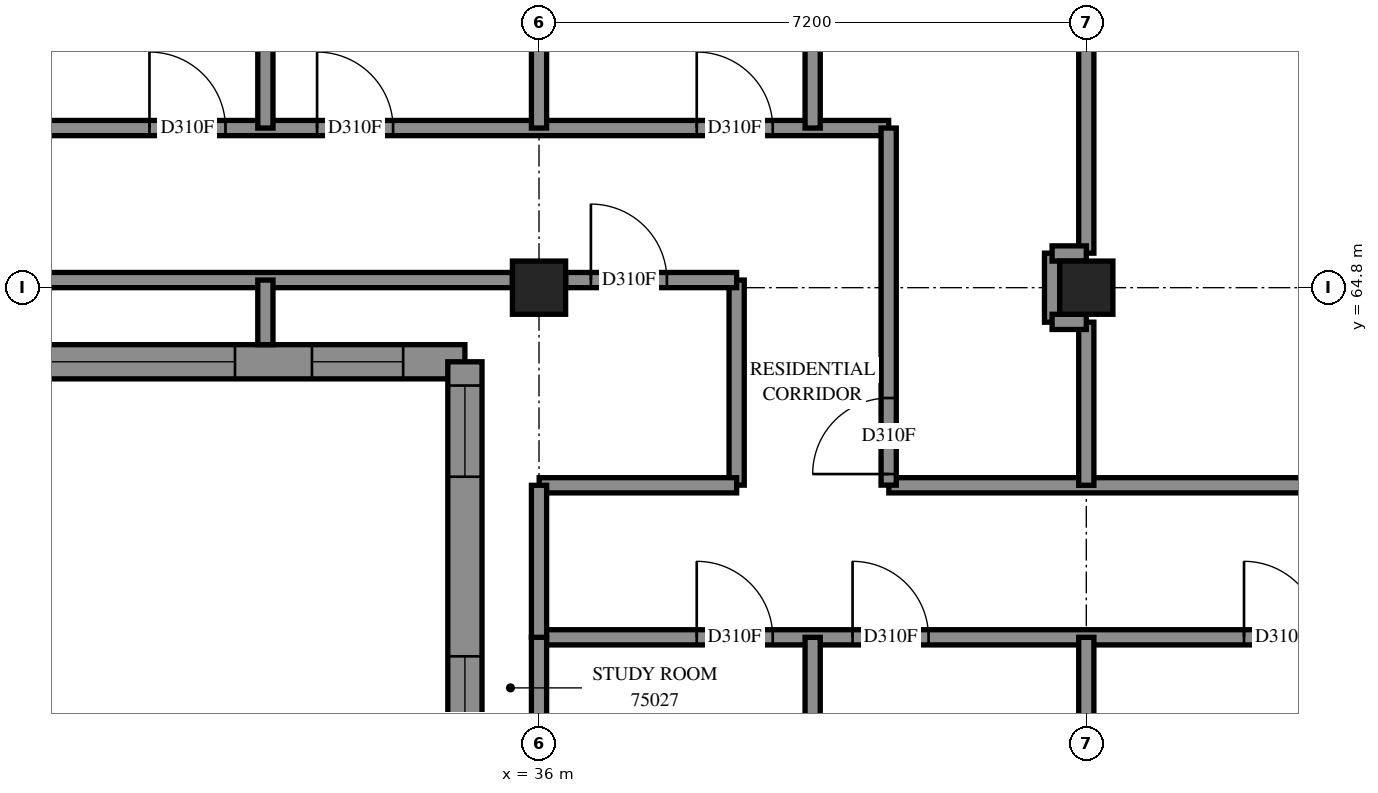
"""IFC4 building model, lengths in metres.
Left out: names, types, materials, properties, quantities, classifications, styles, units other than length and angle.
Written with IfcOpenShell. Run it as: python <this file> out.ifc"""

import sys

from ifc_helpers import new_model, si_unit, direction, frame, frame_2d, origin, origin_2d, place, context, subcontext, project, spatial, polyline, rectangle, outline, extrude, element, fill, save


model = new_model("IFC4")
c1 = context("Model", 3, precision=1e-05, world=origin(), true_north=direction((0.0, 1.0)))
c2 = subcontext(c1, "Body", "Model", "MODEL_VIEW")
j1 = project(units=[si_unit("LENGTHUNIT", "METRE"), si_unit("PLANEANGLEUNIT", "RADIAN")], contexts=[c1])
p1 = place(None, origin())
s1 = spatial("IfcSite", under=j1, at=p1, CompositionType="ELEMENT")
p2 = place(p1, origin())
s2 = spatial("IfcBuilding", under=s1, at=p2, CompositionType="ELEMENT")
p3 = place(p2, frame((0.0, 0.0, 274.4)))
s3 = spatial("IfcBuildingStorey", under=s2, at=p3, CompositionType="ELEMENT", Elevation=274.4)
for number, where, z_axis, x_axis in (
    (1, (36.0, 64.8, 0.0), (0.0, 0.0, 1.0), (1.0, 0.0, 0.0)),
    (2, (43.2, 64.8, 0.0), (0.0, 0.0, 1.0), (1.0, 0.0, 0.0)),
):
    element("IfcColumn", number, at=place(p3, frame(where, z_axis=z_axis, x_axis=x_axis)), inside=s3, PredefinedType="COLUMN", context=c2, shape_type="SweptSolid", body=[
        extrude(rectangle(XDim=0.7, YDim=0.7, at=origin_2d()), origin(), (0.0, 0.0, 1.0), 3.1),
    ])
p4 = place(p3, frame((26.653, 63.825, 0.0), z_axis=(0.0, 0.0, 1.0), x_axis=(1.0, 0.0, 0.0)))
e3 = element("IfcWall", 3, at=p4, inside=s3, PredefinedType="SOLIDWALL", context=c2, shape_type="SweptSolid", body=[
    extrude(outline(polyline([(-0.225, -0.225), (8.147, -0.225), (8.597, 0.225), (0.225, 0.225), (-0.225, -0.225)])), origin(), (0.0, 0.0, 1.0), 3.1),
])
p5 = place(p4, frame((2.547, 0.0, 0.45)))
e4 = element("IfcOpeningElement", 4, at=p5, cuts=e3, PredefinedType="OPENING", context=c2, shape_type="SweptSolid", body=[
    extrude(rectangle(XDim=2.8, YDim=2.55, at=frame_2d((1.4, 1.275))), frame((0.0, 0.235, 0.0), z_axis=(0.0, -1.0, 0.0), x_axis=(1.0, 0.0, 0.0)), (0.0, 0.0, 1.0), 0.47),
])
p6 = place(p4, frame((0.686, 0.0, 0.45)))
e5 = element("IfcOpeningElement", 5, at=p6, cuts=e3, PredefinedType="OPENING", context=c2, shape_type="SweptSolid", body=[
    extrude(rectangle(XDim=1.2, YDim=2.55, at=frame_2d((0.6, 1.275))), frame((0.0, 0.235, 0.0), z_axis=(0.0, -1.0, 0.0), x_axis=(1.0, 0.0, 0.0)), (0.0, 0.0, 1.0), 0.47),
])
p7 = place(p4, frame((6.359, 0.0, 0.45)))
e6 = element("IfcOpeningElement", 6, at=p7, cuts=e3, PredefinedType="OPENING", context=c2, shape_type="SweptSolid", body=[
    extrude(rectangle(XDim=1.2, YDim=2.55, at=frame_2d((0.6, 1.275))), frame((0.0, 0.235, 0.0), z_axis=(0.0, -1.0, 0.0), x_axis=(1.0, 0.0, 0.0)), (0.0, 0.0, 1.0), 0.47),
])
p8 = place(p3, frame((35.025, 63.825, 0.0), z_axis=(0.0, 0.0, 1.0), x_axis=(0.0, -1.0, 0.0)))
e7 = element("IfcWall", 7, at=p8, inside=s3, PredefinedType="SOLIDWALL", context=c2, shape_type="SweptSolid", body=[
    extrude(outline(polyline([(0.225, -0.225), (7.425, -0.225), (6.975, 0.225), (-0.225, 0.225), (0.225, -0.225)])), origin(), (0.0, 0.0, 1.0), 3.1),
])
p9 = place(p8, frame((0.312, 0.0, 0.45)))
e8 = element("IfcOpeningElement", 8, at=p9, cuts=e7, PredefinedType="OPENING", context=c2, shape_type="SweptSolid", body=[
    extrude(rectangle(XDim=1.2, YDim=2.55, at=frame_2d((0.6, 1.275))), frame((0.0, 0.235, 0.0), z_axis=(0.0, -1.0, 0.0), x_axis=(1.0, 0.0, 0.0)), (0.0, 0.0, 1.0), 0.47),
])
p10 = place(p8, frame((3.875, 0.0, 0.7)))
e9 = element("IfcOpeningElement", 9, at=p10, cuts=e7, PredefinedType="OPENING", context=c2, shape_type="SweptSolid", body=[
    extrude(rectangle(XDim=1.8, YDim=2.3, at=frame_2d((0.9, 1.15))), frame((0.0, 0.235, 0.0), z_axis=(0.0, -1.0, 0.0), x_axis=(1.0, 0.0, 0.0)), (0.0, 0.0, 1.0), 0.47),
])
p11 = place(p3, frame((36.0, 60.2, 0.0), z_axis=(0.0, 0.0, 1.0), x_axis=(1.0, 0.0, 0.0)))
e10 = element("IfcWall", 10, at=p11, inside=s3, PredefinedType="PARTITIONING", context=c2, shape_type="SweptSolid", body=[
    extrude(rectangle(XDim=17.0, YDim=0.2, at=frame_2d((8.5, 0.0))), origin(), (0.0, 0.0, 1.0), 3.1),
])
p12 = place(p11, frame((15.802, 0.0, 0.0)))
e11 = element("IfcOpeningElement", 11, at=p12, cuts=e10, PredefinedType="OPENING", context=c2, shape_type="SweptSolid", body=[
    extrude(rectangle(XDim=1.0, YDim=2.1, at=frame_2d((0.5, 1.05))), frame((0.0, 0.11, 0.0), z_axis=(0.0, -1.0, 0.0), x_axis=(1.0, 0.0, 0.0)), (0.0, 0.0, 1.0), 0.22),
])
p13 = place(p11, frame((2.075, 0.0, 0.0)))
e12 = element("IfcOpeningElement", 12, at=p13, cuts=e10, PredefinedType="OPENING", context=c2, shape_type="SweptSolid", body=[
    extrude(rectangle(XDim=1.0, YDim=2.1, at=frame_2d((0.5, 1.05))), frame((0.0, 0.11, 0.0), z_axis=(0.0, -1.0, 0.0), x_axis=(1.0, 0.0, 0.0)), (0.0, 0.0, 1.0), 0.22),
])
p14 = place(p11, frame((4.125, 0.0, 0.0)))
e13 = element("IfcOpeningElement", 13, at=p14, cuts=e10, PredefinedType="OPENING", context=c2, shape_type="SweptSolid", body=[
    extrude(rectangle(XDim=1.0, YDim=2.1, at=frame_2d((0.5, 1.05))), frame((0.0, 0.11, 0.0), z_axis=(0.0, -1.0, 0.0), x_axis=(1.0, 0.0, 0.0)), (0.0, 0.0, 1.0), 0.22),
])
p15 = place(p11, frame((9.275, 0.0, 0.0)))
e14 = element("IfcOpeningElement", 14, at=p15, cuts=e10, PredefinedType="OPENING", context=c2, shape_type="SweptSolid", body=[
    extrude(rectangle(XDim=1.0, YDim=2.1, at=frame_2d((0.5, 1.05))), frame((0.0, 0.11, 0.0), z_axis=(0.0, -1.0, 0.0), x_axis=(1.0, 0.0, 0.0)), (0.0, 0.0, 1.0), 0.22),
])
p16 = place(p11, frame((11.48, 0.0, 0.0)))
e15 = element("IfcOpeningElement", 15, at=p16, cuts=e10, PredefinedType="OPENING", context=c2, shape_type="SweptSolid", body=[
    extrude(rectangle(XDim=1.0, YDim=2.1, at=frame_2d((0.5, 1.05))), frame((0.0, 0.11, 0.0), z_axis=(0.0, -1.0, 0.0), x_axis=(1.0, 0.0, 0.0)), (0.0, 0.0, 1.0), 0.22),
])
p17 = place(p3, frame((28.8, 66.9, 0.0), z_axis=(0.0, 0.0, 1.0), x_axis=(1.0, 0.0, 0.0)))
e16 = element("IfcWall", 16, at=p17, inside=s3, PredefinedType="PARTITIONING", context=c2, shape_type="SweptSolid", body=[
    extrude(rectangle(XDim=11.8, YDim=0.2, at=frame_2d((5.9, 0.0))), origin(), (0.0, 0.0, 1.0), 3.1),
])
p18 = place(p17, frame((2.075, 0.0, 0.0)))
e17 = element("IfcOpeningElement", 17, at=p18, cuts=e16, PredefinedType="OPENING", context=c2, shape_type="SweptSolid", body=[
    extrude(rectangle(XDim=1.0, YDim=2.1, at=frame_2d((0.5, 1.05))), frame((0.0, 0.11, 0.0), z_axis=(0.0, -1.0, 0.0), x_axis=(1.0, 0.0, 0.0)), (0.0, 0.0, 1.0), 0.22),
])
p19 = place(p17, frame((9.275, 0.0, 0.0)))
e18 = element("IfcOpeningElement", 18, at=p19, cuts=e16, PredefinedType="OPENING", context=c2, shape_type="SweptSolid", body=[
    extrude(rectangle(XDim=1.0, YDim=2.1, at=frame_2d((0.5, 1.05))), frame((0.0, 0.11, 0.0), z_axis=(0.0, -1.0, 0.0), x_axis=(1.0, 0.0, 0.0)), (0.0, 0.0, 1.0), 0.22),
])
p20 = place(p17, frame((4.28, 0.0, 0.0)))
e19 = element("IfcOpeningElement", 19, at=p20, cuts=e16, PredefinedType="OPENING", context=c2, shape_type="SweptSolid", body=[
    extrude(rectangle(XDim=1.0, YDim=2.1, at=frame_2d((0.5, 1.05))), frame((0.0, 0.11, 0.0), z_axis=(0.0, -1.0, 0.0), x_axis=(1.0, 0.0, 0.0)), (0.0, 0.0, 1.0), 0.22),
])
p21 = place(p3, frame((40.602, 62.2, 0.0), z_axis=(0.0, 0.0, 1.0), x_axis=(1.0, 0.0, 0.0)))
e20 = element("IfcWall", 20, at=p21, inside=s3, PredefinedType="PARTITIONING", context=c2, shape_type="SweptSolid", body=[
    extrude(rectangle(XDim=9.798, YDim=0.2, at=frame_2d((4.899, 0.0))), origin(), (0.0, 0.0, 1.0), 3.1),
])
p22 = place(p21, frame((6.446, 0.0, 0.0)))
e21 = element("IfcOpeningElement", 21, at=p22, cuts=e20, PredefinedType="OPENING", context=c2, shape_type="SweptSolid", body=[
    extrude(rectangle(XDim=1.0, YDim=2.1, at=frame_2d((0.5, 1.05))), frame((0.0, 0.11, 0.0), z_axis=(0.0, -1.0, 0.0), x_axis=(1.0, 0.0, 0.0)), (0.0, 0.0, 1.0), 0.22),
])
p23 = place(p3, frame((29.15, 64.9, 0.0), z_axis=(0.0, 0.0, 1.0), x_axis=(1.0, 0.0, 0.0)))
e22 = element("IfcWall", 22, at=p23, inside=s3, PredefinedType="PARTITIONING", context=c2, shape_type="SweptSolid", body=[
    extrude(rectangle(XDim=6.5, YDim=0.2, at=frame_2d((3.25, 0.0))), origin(), (0.0, 0.0, 1.0), 2.6),
])
p24 = place(p3, frame((43.2, 65.254, 0.0), z_axis=(0.0, 0.0, 1.0), x_axis=(0.0, 1.0, 0.0)))
e23 = element("IfcWall", 23, at=p24, inside=s3, PredefinedType="PARTITIONING", context=c2, shape_type="SweptSolid", body=[
    extrude(rectangle(XDim=6.292, YDim=0.2, at=frame_2d((3.146, 0.0))), origin(), (0.0, 0.0, 1.0), 3.1),
])
p25 = place(p3, frame((32.4, 66.9, 0.0), z_axis=(0.0, 0.0, 1.0), x_axis=(0.0, 1.0, 0.0)))
e24 = element("IfcWall", 24, at=p25, inside=s3, PredefinedType="PARTITIONING", context=c2, shape_type="SweptSolid", body=[
    extrude(rectangle(XDim=6.163, YDim=0.2, at=frame_2d((3.081, 0.0))), origin(), (0.0, 0.0, 1.0), 3.1),
])
p26 = place(p3, frame((39.6, 66.9, 0.0), z_axis=(0.0, 0.0, 1.0), x_axis=(0.0, 1.0, 0.0)))
e25 = element("IfcWall", 25, at=p26, inside=s3, PredefinedType="PARTITIONING", context=c2, shape_type="SweptSolid", body=[
    extrude(rectangle(XDim=6.091, YDim=0.2, at=frame_2d((3.046, 0.0))), origin(), (0.0, 0.0, 1.0), 3.1),
])
p27 = place(p3, frame((40.6, 62.202, 0.0), z_axis=(0.0, 0.0, 1.0), x_axis=(0.0, 1.0, 0.0)))
e26 = element("IfcWall", 26, at=p27, inside=s3, PredefinedType="PARTITIONING", context=c2, shape_type="SweptSolid", body=[
    extrude(rectangle(XDim=4.698, YDim=0.2, at=frame_2d((2.349, 0.0))), origin(), (0.0, 0.0, 1.0), 3.1),
])
p28 = place(p27, frame((0.146, 0.0, 0.0)))
e27 = element("IfcOpeningElement", 27, at=p28, cuts=e26, PredefinedType="OPENING", context=c2, shape_type="SweptSolid", body=[
    extrude(rectangle(XDim=1.0, YDim=2.1, at=frame_2d((0.5, 1.05))), frame((0.0, 0.11, 0.0), z_axis=(0.0, -1.0, 0.0), x_axis=(1.0, 0.0, 0.0)), (0.0, 0.0, 1.0), 0.22),
])
p29 = place(p3, frame((36.0, 66.9, 0.0), z_axis=(0.0, 0.0, 1.0), x_axis=(0.0, 1.0, 0.0)))
e28 = element("IfcWall", 28, at=p29, inside=s3, PredefinedType="PARTITIONING", context=c2, shape_type="SweptSolid", body=[
    extrude(rectangle(XDim=4.646, YDim=0.2, at=frame_2d((2.323, 0.0))), origin(), (0.0, 0.0, 1.0), 3.1),
])
p30 = place(p3, frame((39.6, 56.85, 0.0), z_axis=(0.0, 0.0, 1.0), x_axis=(0.0, 1.0, 0.0)))
e29 = element("IfcWall", 29, at=p30, inside=s3, PredefinedType="PARTITIONING", context=c2, shape_type="SweptSolid", body=[
    extrude(rectangle(XDim=3.35, YDim=0.2, at=frame_2d((1.675, 0.0))), origin(), (0.0, 0.0, 1.0), 3.1),
])
p31 = place(p3, frame((38.6, 62.202, 0.0), z_axis=(0.0, 0.0, 1.0), x_axis=(0.0, 1.0, 0.0)))
e30 = element("IfcWall", 30, at=p31, inside=s3, PredefinedType="PARTITIONING", context=c2, shape_type="SweptSolid", body=[
    extrude(rectangle(XDim=2.698, YDim=0.2, at=frame_2d((1.349, 0.0))), origin(), (0.0, 0.0, 1.0), 3.1),
])
p32 = place(p3, frame((36.002, 62.2, 0.0), z_axis=(0.0, 0.0, 1.0), x_axis=(1.0, 0.0, 0.0)))
e31 = element("IfcWall", 31, at=p32, inside=s3, PredefinedType="PARTITIONING", context=c2, shape_type="SweptSolid", body=[
    extrude(rectangle(XDim=2.598, YDim=0.2, at=frame_2d((1.299, 0.0))), origin(), (0.0, 0.0, 1.0), 3.1),
])
p33 = place(p3, frame((36.35, 64.9, 0.0), z_axis=(0.0, 0.0, 1.0), x_axis=(1.0, 0.0, 0.0)))
e32 = element("IfcWall", 32, at=p33, inside=s3, PredefinedType="PARTITIONING", context=c2, shape_type="SweptSolid", body=[
    extrude(rectangle(XDim=2.25, YDim=0.2, at=frame_2d((1.125, 0.0))), origin(), (0.0, 0.0, 1.0), 3.1),
])
p34 = place(p33, frame((0.333, 0.0, 0.0)))
e33 = element("IfcOpeningElement", 33, at=p34, cuts=e32, PredefinedType="OPENING", context=c2, shape_type="SweptSolid", body=[
    extrude(rectangle(XDim=1.0, YDim=2.1, at=frame_2d((0.5, 1.05))), frame((0.0, 0.11, 0.0), z_axis=(0.0, -1.0, 0.0), x_axis=(1.0, 0.0, 0.0)), (0.0, 0.0, 1.0), 0.22),
])
p35 = place(p3, frame((36.0, 57.95, 0.0), z_axis=(0.0, 0.0, 1.0), x_axis=(0.0, 1.0, 0.0)))
e34 = element("IfcWall", 34, at=p35, inside=s3, PredefinedType="PARTITIONING", context=c2, shape_type="SweptSolid", body=[
    extrude(rectangle(XDim=2.25, YDim=0.2, at=frame_2d((1.125, 0.0))), origin(), (0.0, 0.0, 1.0), 2.6),
])
p36 = place(p3, frame((43.2, 57.95, 0.0), z_axis=(0.0, 0.0, 1.0), x_axis=(0.0, 1.0, 0.0)))
e35 = element("IfcWall", 35, at=p36, inside=s3, PredefinedType="PARTITIONING", context=c2, shape_type="SweptSolid", body=[
    extrude(rectangle(XDim=2.25, YDim=0.2, at=frame_2d((1.125, 0.0))), origin(), (0.0, 0.0, 1.0), 3.1),
])
p37 = place(p3, frame((43.2, 62.2, 0.0), z_axis=(0.0, 0.0, 1.0), x_axis=(0.0, 1.0, 0.0)))
e36 = element("IfcWall", 36, at=p37, inside=s3, PredefinedType="PARTITIONING", context=c2, shape_type="SweptSolid", body=[
    extrude(rectangle(XDim=2.146, YDim=0.2, at=frame_2d((1.073, 0.0))), origin(), (0.0, 0.0, 1.0), 3.1),
])
p38 = place(p3, frame((36.0, 60.2, 0.0), z_axis=(0.0, 0.0, 1.0), x_axis=(0.0, 1.0, 0.0)))
e37 = element("IfcWall", 37, at=p38, inside=s3, PredefinedType="PARTITIONING", context=c2, shape_type="SweptSolid", body=[
    extrude(rectangle(XDim=2.0, YDim=0.2, at=frame_2d((1.0, 0.0))), origin(), (0.0, 0.0, 1.0), 2.6),
])
p39 = place(p3, frame((42.75, 64.346, 0.0), z_axis=(0.0, 0.0, 1.0), x_axis=(0.0, 1.0, 0.0)))
e38 = element("IfcWall", 38, at=p39, inside=s3, PredefinedType="PARTITIONING", context=c2, shape_type="SweptSolid", body=[
    extrude(rectangle(XDim=0.908, YDim=0.2, at=frame_2d((0.454, 0.0))), origin(), (0.0, 0.0, 1.0), 3.1),
])
p40 = place(p3, frame((32.4, 64.05, 0.0), z_axis=(0.0, 0.0, 1.0), x_axis=(0.0, 1.0, 0.0)))
e39 = element("IfcWall", 39, at=p40, inside=s3, PredefinedType="PARTITIONING", context=c2, shape_type="SweptSolid", body=[
    extrude(rectangle(XDim=0.85, YDim=0.2, at=frame_2d((0.425, 0.0))), origin(), (0.0, 0.0, 1.0), 3.1),
])
for number, where, z_axis, x_axis in (
    (40, (42.75, 65.25, 0.0), (0.0, 0.0, 1.0), (1.0, 0.0, 0.0)),
    (41, (42.75, 64.35, 0.0), (0.0, 0.0, 1.0), (1.0, 0.0, 0.0)),
):
    element("IfcWall", number, at=place(p3, frame(where, z_axis=z_axis, x_axis=x_axis)), inside=s3, PredefinedType="PARTITIONING", context=c2, shape_type="SweptSolid", body=[
        extrude(rectangle(XDim=0.45, YDim=0.2, at=frame_2d((0.225, 0.0))), origin(), (0.0, 0.0, 1.0), 3.1),
    ])
p41 = place(p5, origin())
e42 = element("IfcWindow", 42, at=p41, inside=s3, PartitioningType="SINGLE_PANEL", PredefinedType="WINDOW", context=c2, shape_type="SweptSolid", body=[
    extrude(rectangle(XDim=2.8, YDim=2.55, at=frame_2d((1.4, 1.275))), frame((0.0, 0.205, 0.0), z_axis=(0.0, -1.0, 0.0), x_axis=(1.0, 0.0, 0.0)), (0.0, 0.0, 1.0), 0.06),
])
fill(e4, e42)
p42 = place(p7, origin())
e43 = element("IfcWindow", 43, at=p42, inside=s3, PartitioningType="SINGLE_PANEL", PredefinedType="WINDOW", context=c2, shape_type="SweptSolid", body=[
    extrude(rectangle(XDim=1.2, YDim=2.55, at=frame_2d((0.6, 1.275))), frame((0.0, 0.205, 0.0), z_axis=(0.0, -1.0, 0.0), x_axis=(1.0, 0.0, 0.0)), (0.0, 0.0, 1.0), 0.06),
])
fill(e6, e43)
p43 = place(p9, origin())
e44 = element("IfcWindow", 44, at=p43, inside=s3, PartitioningType="SINGLE_PANEL", PredefinedType="WINDOW", context=c2, shape_type="SweptSolid", body=[
    extrude(rectangle(XDim=1.2, YDim=2.55, at=frame_2d((0.6, 1.275))), frame((0.0, 0.205, 0.0), z_axis=(0.0, -1.0, 0.0), x_axis=(1.0, 0.0, 0.0)), (0.0, 0.0, 1.0), 0.06),
])
fill(e8, e44)
p44 = place(p18, origin())
e45 = element("IfcDoor", 45, at=p44, inside=s3, OperationType="SINGLE_SWING_RIGHT", PredefinedType="DOOR", context=c2, shape_type="SweptSolid", body=[
    extrude(rectangle(XDim=1.0, YDim=2.1, at=frame_2d((0.5, 1.05))), frame((0.0, 0.025, 0.0), z_axis=(0.0, -1.0, 0.0), x_axis=(1.0, 0.0, 0.0)), (0.0, 0.0, 1.0), 0.05),
])
fill(e17, e45)
p45 = place(p19, origin())
e46 = element("IfcDoor", 46, at=p45, inside=s3, OperationType="SINGLE_SWING_RIGHT", PredefinedType="DOOR", context=c2, shape_type="SweptSolid", body=[
    extrude(rectangle(XDim=1.0, YDim=2.1, at=frame_2d((0.5, 1.05))), frame((0.0, 0.025, 0.0), z_axis=(0.0, -1.0, 0.0), x_axis=(1.0, 0.0, 0.0)), (0.0, 0.0, 1.0), 0.05),
])
fill(e18, e46)
p46 = place(p34, origin())
e47 = element("IfcDoor", 47, at=p46, inside=s3, OperationType="SINGLE_SWING_RIGHT", PredefinedType="DOOR", context=c2, shape_type="SweptSolid", body=[
    extrude(rectangle(XDim=1.0, YDim=2.1, at=frame_2d((0.5, 1.05))), frame((0.0, 0.025, 0.0), z_axis=(0.0, -1.0, 0.0), x_axis=(1.0, 0.0, 0.0)), (0.0, 0.0, 1.0), 0.05),
])
fill(e33, e47)
p47 = place(p20, origin())
e48 = element("IfcDoor", 48, at=p47, inside=s3, OperationType="SINGLE_SWING_LEFT", PredefinedType="DOOR", context=c2, shape_type="SweptSolid", body=[
    extrude(rectangle(XDim=1.0, YDim=2.1, at=frame_2d((0.5, 1.05))), frame((0.0, 0.025, 0.0), z_axis=(0.0, -1.0, 0.0), x_axis=(1.0, 0.0, 0.0)), (0.0, 0.0, 1.0), 0.05),
])
fill(e19, e48)
p48 = place(p13, origin())
e49 = element("IfcDoor", 49, at=p48, inside=s3, OperationType="SINGLE_SWING_LEFT", PredefinedType="DOOR", context=c2, shape_type="SweptSolid", body=[
    extrude(rectangle(XDim=1.0, YDim=2.1, at=frame_2d((0.5, 1.05))), frame((0.0, 0.025, 0.0), z_axis=(0.0, -1.0, 0.0), x_axis=(1.0, 0.0, 0.0)), (0.0, 0.0, 1.0), 0.05),
])
fill(e12, e49)
p49 = place(p14, origin())
e50 = element("IfcDoor", 50, at=p49, inside=s3, OperationType="SINGLE_SWING_RIGHT", PredefinedType="DOOR", context=c2, shape_type="SweptSolid", body=[
    extrude(rectangle(XDim=1.0, YDim=2.1, at=frame_2d((0.5, 1.05))), frame((0.0, 0.025, 0.0), z_axis=(0.0, -1.0, 0.0), x_axis=(1.0, 0.0, 0.0)), (0.0, 0.0, 1.0), 0.05),
])
fill(e13, e50)
p50 = place(p15, origin())
e51 = element("IfcDoor", 51, at=p50, inside=s3, OperationType="SINGLE_SWING_LEFT", PredefinedType="DOOR", context=c2, shape_type="SweptSolid", body=[
    extrude(rectangle(XDim=1.0, YDim=2.1, at=frame_2d((0.5, 1.05))), frame((0.0, 0.025, 0.0), z_axis=(0.0, -1.0, 0.0), x_axis=(1.0, 0.0, 0.0)), (0.0, 0.0, 1.0), 0.05),
])
fill(e14, e51)
p51 = place(p28, origin())
e52 = element("IfcDoor", 52, at=p51, inside=s3, OperationType="SINGLE_SWING_LEFT", PredefinedType="DOOR", context=c2, shape_type="SweptSolid", body=[
    extrude(rectangle(XDim=1.0, YDim=2.1, at=frame_2d((0.5, 1.05))), frame((0.0, 0.025, 0.0), z_axis=(0.0, -1.0, 0.0), x_axis=(1.0, 0.0, 0.0)), (0.0, 0.0, 1.0), 0.05),
])
fill(e27, e52)
p52 = place(p10, origin())
e53 = element("IfcWindow", 53, at=p52, inside=s3, PartitioningType="SINGLE_PANEL", PredefinedType="WINDOW", context=c2, shape_type="SweptSolid", body=[
    extrude(rectangle(XDim=1.8, YDim=2.3, at=frame_2d((0.9, 1.15))), frame((0.0, 0.205, 0.0), z_axis=(0.0, -1.0, 0.0), x_axis=(1.0, 0.0, 0.0)), (0.0, 0.0, 1.0), 0.06),
])
fill(e9, e53)
save(model, sys.argv[1])
